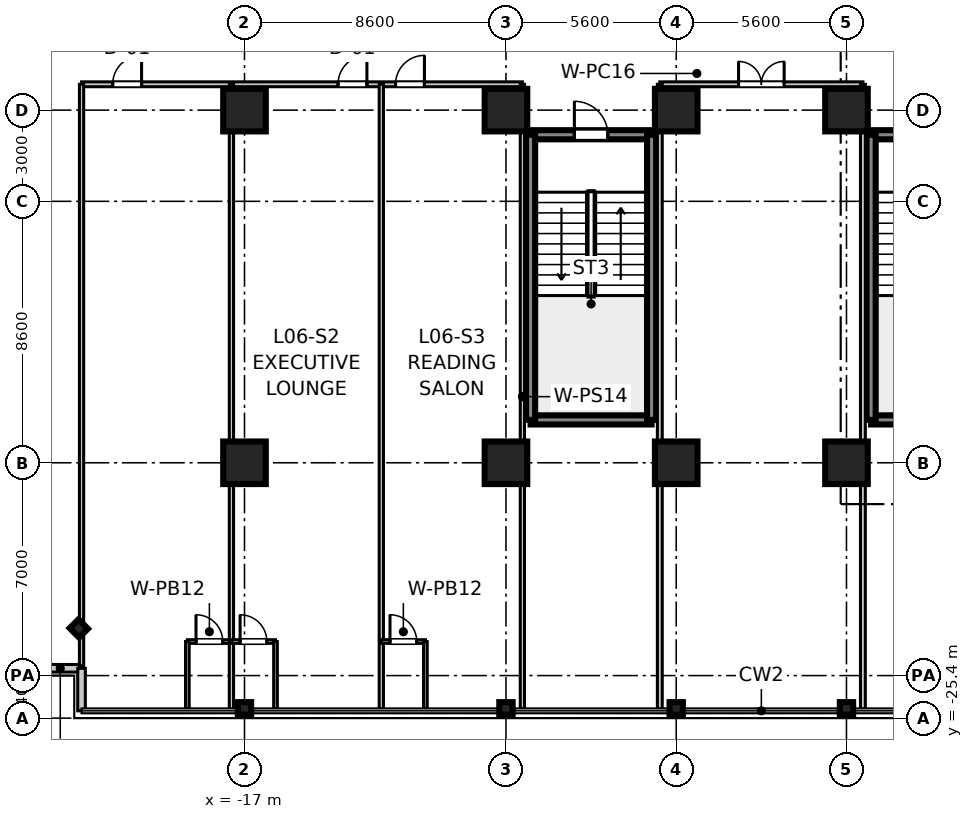
"""IFC4 building model, lengths in metres.
Left out: names, types, materials, properties, quantities, classifications, styles, units other than length and angle.
Written with IfcOpenShell. Run it as: python <this file> out.ifc"""

import sys

from ifc_helpers import new_model, si_unit, direction, frame, frame_2d, origin, origin_2d, place, context, subcontext, project, spatial, rectangle, i_section, extrude, source, transform, mapped, element, fill, save


model = new_model("IFC4")
c1 = context("Model", 3, precision=1e-05, world=origin(), true_north=direction((0.0, 1.0)))
c2 = subcontext(c1, "Body", "Model", "MODEL_VIEW")
j1 = project(units=[si_unit("LENGTHUNIT", "METRE"), si_unit("PLANEANGLEUNIT", "RADIAN")], contexts=[c1])
p1 = place(None, origin())
s1 = spatial("IfcSite", under=j1, at=p1, CompositionType="ELEMENT")
p2 = place(p1, origin())
s2 = spatial("IfcBuilding", under=s1, at=p2, CompositionType="ELEMENT")
p3 = place(p2, frame((0.0, 0.0, 32.4)))
s3 = spatial("IfcBuildingStorey", under=s2, at=p3, CompositionType="ELEMENT", Elevation=32.4)
m1 = source(origin(), c2, "Body", "SweptSolid", [
    extrude(rectangle(XDim=1.4, YDim=1.4, at=origin_2d()), origin(), (0.0, 0.0, 1.0), 3.605),
])
for number, where, z_axis, x_axis in (
    (1, (-17.0, -17.0, 0.0), (0.0, 0.0, 1.0), (1.0, 0.0, 0.0)),
    (2, (-17.0, -5.4, 0.0), (0.0, 0.0, 1.0), (1.0, 0.0, 0.0)),
    (3, (-8.4, -17.0, 0.0), (0.0, 0.0, 1.0), (1.0, 0.0, 0.0)),
    (4, (-8.4, -5.4, 0.0), (0.0, 0.0, 1.0), (1.0, 0.0, 0.0)),
    (5, (-2.8, -17.0, 0.0), (0.0, 0.0, 1.0), (1.0, 0.0, 0.0)),
    (6, (-2.8, -5.4, 0.0), (0.0, 0.0, 1.0), (1.0, 0.0, 0.0)),
    (7, (2.8, -17.0, 0.0), (0.0, 0.0, 1.0), (1.0, 0.0, 0.0)),
    (8, (2.8, -5.4, 0.0), (0.0, 0.0, 1.0), (1.0, 0.0, 0.0)),
):
    element("IfcColumn", number, at=place(p3, frame(where, z_axis=z_axis, x_axis=x_axis)), inside=s3, PredefinedType="COLUMN", context=c2, shape_type="MappedRepresentation", body=[
        mapped(m1, transform((0.0, 0.0, 0.0), scale=1.0)),
    ])
m2 = source(origin(), c2, "Body", "SweptSolid", [
    extrude(i_section(OverallWidth=0.412, OverallDepth=0.438, WebThickness=0.023, FlangeThickness=0.036, at=origin_2d()), origin(), (0.0, 0.0, 1.0), 3.605),
])
for number, where, z_axis, x_axis in (
    (9, (-17.0, -25.08, 0.0), (0.0, 0.0, 1.0), (0.0, 1.0, 0.0)),
    (10, (-8.4, -25.08, 0.0), (0.0, 0.0, 1.0), (0.0, 1.0, 0.0)),
    (11, (-2.8, -25.08, 0.0), (0.0, 0.0, 1.0), (0.0, 1.0, 0.0)),
    (12, (2.8, -25.08, 0.0), (0.0, 0.0, 1.0), (0.0, 1.0, 0.0)),
    (13, (-22.45, -22.45, 0.0), (0.0, 0.0, 1.0), (0.707, 0.707, 0.0)),
):
    element("IfcColumn", number, at=place(p3, frame(where, z_axis=z_axis, x_axis=x_axis)), inside=s3, PredefinedType="COLUMN", context=c2, shape_type="MappedRepresentation", body=[
        mapped(m2, transform((0.0, 0.0, 0.0), scale=1.0)),
    ])
m3 = source(origin(), c2, "Body", "SweptSolid", [
    extrude(rectangle(XDim=3.98, YDim=0.3, at=frame_2d((1.99, 0.0))), origin(), (0.0, 0.0, 1.0), 3.37),
])
for number, where, z_axis, x_axis in (
    (14, (3.61, -15.59, 0.0), (0.0, 0.0, 1.0), (1.0, 0.0, 0.0)),
    (15, (3.61, -6.21, 0.0), (0.0, 0.0, 1.0), (1.0, 0.0, 0.0)),
):
    element("IfcWall", number, at=place(p3, frame(where, z_axis=z_axis, x_axis=x_axis)), inside=s3, PredefinedType="SHEAR", context=c2, shape_type="MappedRepresentation", body=[
        mapped(m3, transform((0.0, 0.0, 0.0), scale=1.0)),
    ])
m4 = source(origin(), c2, "Body", "SweptSolid", [
    extrude(rectangle(XDim=9.38, YDim=0.3, at=frame_2d((4.69, 0.0))), origin(), (0.0, 0.0, 1.0), 3.37),
])
p4 = place(p3, frame((3.61, -15.59, 0.0), z_axis=(0.0, 0.0, 1.0), x_axis=(0.0, 1.0, 0.0)))
e16 = element("IfcWall", 16, at=p4, inside=s3, PredefinedType="SHEAR", context=c2, shape_type="MappedRepresentation", body=[
    mapped(m4, transform((0.0, 0.0, 0.0), scale=1.0)),
])
p5 = place(p3, frame((-7.59, -15.59, 0.0), z_axis=(0.0, 0.0, 1.0), x_axis=(1.0, 0.0, 0.0)))
e17 = element("IfcWall", 17, at=p5, inside=s3, PredefinedType="SHEAR", context=c2, shape_type="MappedRepresentation", body=[
    mapped(m3, transform((0.0, 0.0, 0.0), scale=1.0)),
])
p6 = place(p3, frame((-7.59, -6.21, 0.0), z_axis=(0.0, 0.0, 1.0), x_axis=(1.0, 0.0, 0.0)))
e18 = element("IfcWall", 18, at=p6, inside=s3, PredefinedType="SHEAR", context=c2, shape_type="MappedRepresentation", body=[
    mapped(m3, transform((0.0, 0.0, 0.0), scale=1.0)),
])
p7 = place(p6, frame((1.44, 0.0, 0.0)))
e19 = element("IfcOpeningElement", 19, at=p7, cuts=e18, PredefinedType="OPENING", context=c2, shape_type="SweptSolid", body=[
    extrude(rectangle(XDim=1.1, YDim=2.15, at=frame_2d((0.55, 1.075))), frame((0.0, 0.16, 0.0), z_axis=(0.0, -1.0, 0.0), x_axis=(1.0, 0.0, 0.0)), (0.0, 0.0, 1.0), 0.32),
])
for number, where, z_axis, x_axis in (
    (20, (-7.59, -15.59, 0.0), (0.0, 0.0, 1.0), (0.0, 1.0, 0.0)),
    (21, (-3.61, -15.59, 0.0), (0.0, 0.0, 1.0), (0.0, 1.0, 0.0)),
):
    element("IfcWall", number, at=place(p3, frame(where, z_axis=z_axis, x_axis=x_axis)), inside=s3, PredefinedType="SHEAR", context=c2, shape_type="MappedRepresentation", body=[
        mapped(m4, transform((0.0, 0.0, 0.0), scale=1.0)),
    ])
m5 = source(origin(), c2, "Body", "SweptSolid", [
    extrude(rectangle(XDim=1.4, YDim=0.25, at=frame_2d((0.7, 0.0))), origin(), (0.0, 0.0, 1.0), 3.37),
])
for number, where, z_axis, x_axis in (
    (22, (-23.76, -23.76, 0.0), (0.0, 0.0, 1.0), (1.0, 0.0, 0.0)),
    (23, (-22.36, -25.16, 0.0), (0.0, 0.0, 1.0), (0.0, 1.0, 0.0)),
):
    element("IfcWall", number, at=place(p3, frame(where, z_axis=z_axis, x_axis=x_axis)), inside=s3, PredefinedType="STANDARD", context=c2, shape_type="MappedRepresentation", body=[
        mapped(m5, transform((0.0, 0.0, 0.0), scale=1.0)),
    ])
m6 = source(origin(), c2, "Body", "SweptSolid", [
    extrude(rectangle(XDim=14.5, YDim=0.16, at=frame_2d((7.25, 0.0))), origin(), (0.0, 0.0, 1.0), 2.71),
])
p8 = place(p3, frame((-22.36, -4.55, 0.0), z_axis=(0.0, 0.0, 1.0), x_axis=(1.0, 0.0, 0.0)))
e24 = element("IfcWall", 24, at=p8, inside=s3, PredefinedType="PARTITIONING", context=c2, shape_type="MappedRepresentation", body=[
    mapped(m6, transform((0.0, 0.0, 0.0), scale=1.0)),
])
p9 = place(p8, frame((1.025, 0.0, 0.0)))
e25 = element("IfcOpeningElement", 25, at=p9, cuts=e24, PredefinedType="OPENING", context=c2, shape_type="SweptSolid", body=[
    extrude(rectangle(XDim=0.95, YDim=2.1, at=frame_2d((0.475, 1.05))), frame((0.0, 0.09, 0.0), z_axis=(0.0, -1.0, 0.0), x_axis=(1.0, 0.0, 0.0)), (0.0, 0.0, 1.0), 0.18),
])
p10 = place(p8, frame((8.436, 0.0, 0.0)))
e26 = element("IfcOpeningElement", 26, at=p10, cuts=e24, PredefinedType="OPENING", context=c2, shape_type="SweptSolid", body=[
    extrude(rectangle(XDim=0.95, YDim=2.1, at=frame_2d((0.475, 1.05))), frame((0.0, 0.09, 0.0), z_axis=(0.0, -1.0, 0.0), x_axis=(1.0, 0.0, 0.0)), (0.0, 0.0, 1.0), 0.18),
])
p11 = place(p8, frame((10.328, 0.0, 0.0)))
e27 = element("IfcOpeningElement", 27, at=p11, cuts=e24, PredefinedType="OPENING", context=c2, shape_type="SweptSolid", body=[
    extrude(rectangle(XDim=0.95, YDim=2.1, at=frame_2d((0.475, 1.05))), frame((0.0, 0.09, 0.0), z_axis=(0.0, -1.0, 0.0), x_axis=(1.0, 0.0, 0.0)), (0.0, 0.0, 1.0), 0.18),
])
m7 = source(origin(), c2, "Body", "SweptSolid", [
    extrude(rectangle(XDim=19.13, YDim=0.14, at=frame_2d((9.565, 0.0))), origin(), (0.0, 0.0, 1.0), 2.71),
])
p12 = place(p3, frame((-22.36, -23.68, 0.0), z_axis=(0.0, 0.0, 1.0), x_axis=(0.0, 1.0, 0.0)))
e28 = element("IfcWall", 28, at=p12, inside=s3, PredefinedType="PARTITIONING", context=c2, shape_type="MappedRepresentation", body=[
    mapped(m7, transform((0.0, 0.0, 0.0), scale=1.0)),
])
m8 = source(origin(), c2, "Body", "SweptSolid", [
    extrude(rectangle(XDim=20.55, YDim=0.14, at=frame_2d((10.275, 0.0))), origin(), (0.0, 0.0, 1.0), 2.71),
])
p13 = place(p3, frame((-7.86, -25.1, 0.0), z_axis=(0.0, 0.0, 1.0), x_axis=(0.0, 1.0, 0.0)))
e29 = element("IfcWall", 29, at=p13, inside=s3, PredefinedType="PARTITIONING", context=c2, shape_type="MappedRepresentation", body=[
    mapped(m8, transform((0.0, 0.0, 0.0), scale=1.0)),
])
m9 = source(origin(), c2, "Body", "SweptSolid", [
    extrude(rectangle(XDim=1.45, YDim=0.12, at=frame_2d((0.725, 0.0))), origin(), (0.0, 0.0, 1.0), 2.71),
])
p14 = place(p3, frame((-18.88, -22.88, 0.0), z_axis=(0.0, 0.0, 1.0), x_axis=(1.0, 0.0, 0.0)))
e30 = element("IfcWall", 30, at=p14, inside=s3, PredefinedType="PARTITIONING", context=c2, shape_type="MappedRepresentation", body=[
    mapped(m9, transform((0.0, 0.0, 0.0), scale=1.0)),
])
p15 = place(p14, frame((0.285, 0.0, 0.0)))
e31 = element("IfcOpeningElement", 31, at=p15, cuts=e30, PredefinedType="OPENING", context=c2, shape_type="SweptSolid", body=[
    extrude(rectangle(XDim=0.88, YDim=2.1, at=frame_2d((0.44, 1.05))), frame((0.0, 0.07, 0.0), z_axis=(0.0, -1.0, 0.0), x_axis=(1.0, 0.0, 0.0)), (0.0, 0.0, 1.0), 0.14),
])
m10 = source(origin(), c2, "Body", "SweptSolid", [
    extrude(rectangle(XDim=2.22, YDim=0.12, at=frame_2d((1.11, 0.0))), origin(), (0.0, 0.0, 1.0), 2.71),
])
p16 = place(p3, frame((-18.88, -25.1, 0.0), z_axis=(0.0, 0.0, 1.0), x_axis=(0.0, 1.0, 0.0)))
e32 = element("IfcWall", 32, at=p16, inside=s3, PredefinedType="PARTITIONING", context=c2, shape_type="MappedRepresentation", body=[
    mapped(m10, transform((0.0, 0.0, 0.0), scale=1.0)),
])
p17 = place(p3, frame((-17.43, -25.1, 0.0), z_axis=(0.0, 0.0, 1.0), x_axis=(0.0, 1.0, 0.0)))
e33 = element("IfcWall", 33, at=p17, inside=s3, PredefinedType="PARTITIONING", context=c2, shape_type="MappedRepresentation", body=[
    mapped(m8, transform((0.0, 0.0, 0.0), scale=1.0)),
])
p18 = place(p3, frame((-17.43, -22.88, 0.0), z_axis=(0.0, 0.0, 1.0), x_axis=(1.0, 0.0, 0.0)))
e34 = element("IfcWall", 34, at=p18, inside=s3, PredefinedType="PARTITIONING", context=c2, shape_type="MappedRepresentation", body=[
    mapped(m9, transform((0.0, 0.0, 0.0), scale=1.0)),
])
p19 = place(p18, frame((0.285, 0.0, 0.0)))
e35 = element("IfcOpeningElement", 35, at=p19, cuts=e34, PredefinedType="OPENING", context=c2, shape_type="SweptSolid", body=[
    extrude(rectangle(XDim=0.88, YDim=2.1, at=frame_2d((0.44, 1.05))), frame((0.0, 0.07, 0.0), z_axis=(0.0, -1.0, 0.0), x_axis=(1.0, 0.0, 0.0)), (0.0, 0.0, 1.0), 0.14),
])
p20 = place(p3, frame((-15.98, -25.1, 0.0), z_axis=(0.0, 0.0, 1.0), x_axis=(0.0, 1.0, 0.0)))
e36 = element("IfcWall", 36, at=p20, inside=s3, PredefinedType="PARTITIONING", context=c2, shape_type="MappedRepresentation", body=[
    mapped(m10, transform((0.0, 0.0, 0.0), scale=1.0)),
])
p21 = place(p3, frame((-12.5, -25.1, 0.0), z_axis=(0.0, 0.0, 1.0), x_axis=(0.0, 1.0, 0.0)))
e37 = element("IfcWall", 37, at=p21, inside=s3, PredefinedType="PARTITIONING", context=c2, shape_type="MappedRepresentation", body=[
    mapped(m8, transform((0.0, 0.0, 0.0), scale=1.0)),
])
p22 = place(p3, frame((-12.5, -22.88, 0.0), z_axis=(0.0, 0.0, 1.0), x_axis=(1.0, 0.0, 0.0)))
e38 = element("IfcWall", 38, at=p22, inside=s3, PredefinedType="PARTITIONING", context=c2, shape_type="MappedRepresentation", body=[
    mapped(m9, transform((0.0, 0.0, 0.0), scale=1.0)),
])
p23 = place(p22, frame((0.285, 0.0, 0.0)))
e39 = element("IfcOpeningElement", 39, at=p23, cuts=e38, PredefinedType="OPENING", context=c2, shape_type="SweptSolid", body=[
    extrude(rectangle(XDim=0.88, YDim=2.1, at=frame_2d((0.44, 1.05))), frame((0.0, 0.07, 0.0), z_axis=(0.0, -1.0, 0.0), x_axis=(1.0, 0.0, 0.0)), (0.0, 0.0, 1.0), 0.14),
])
p24 = place(p3, frame((-11.05, -25.1, 0.0), z_axis=(0.0, 0.0, 1.0), x_axis=(0.0, 1.0, 0.0)))
e40 = element("IfcWall", 40, at=p24, inside=s3, PredefinedType="PARTITIONING", context=c2, shape_type="MappedRepresentation", body=[
    mapped(m10, transform((0.0, 0.0, 0.0), scale=1.0)),
])
m11 = source(origin(), c2, "Body", "SweptSolid", [
    extrude(rectangle(XDim=6.68, YDim=0.16, at=frame_2d((3.34, 0.0))), origin(), (0.0, 0.0, 1.0), 2.71),
])
p25 = place(p3, frame((-3.34, -4.55, 0.0), z_axis=(0.0, 0.0, 1.0), x_axis=(1.0, 0.0, 0.0)))
e41 = element("IfcWall", 41, at=p25, inside=s3, PredefinedType="PARTITIONING", context=c2, shape_type="MappedRepresentation", body=[
    mapped(m11, transform((0.0, 0.0, 0.0), scale=1.0)),
])
p26 = place(p25, frame((2.59, 0.0, 0.0)))
e42 = element("IfcOpeningElement", 42, at=p26, cuts=e41, PredefinedType="OPENING", context=c2, shape_type="SweptSolid", body=[
    extrude(rectangle(XDim=1.5, YDim=2.15, at=frame_2d((0.75, 1.075))), frame((0.0, 0.09, 0.0), z_axis=(0.0, -1.0, 0.0), x_axis=(1.0, 0.0, 0.0)), (0.0, 0.0, 1.0), 0.18),
])
m12 = source(origin(), c2, "Body", "SweptSolid", [
    extrude(rectangle(XDim=20.55, YDim=0.16, at=frame_2d((10.275, 0.0))), origin(), (0.0, 0.0, 1.0), 2.71),
])
for number, where, z_axis, x_axis in (
    (43, (-3.34, -25.1, 0.0), (0.0, 0.0, 1.0), (0.0, 1.0, 0.0)),
    (44, (3.34, -25.1, 0.0), (0.0, 0.0, 1.0), (0.0, 1.0, 0.0)),
):
    element("IfcWall", number, at=place(p3, frame(where, z_axis=z_axis, x_axis=x_axis)), inside=s3, PredefinedType="PARTITIONING", context=c2, shape_type="MappedRepresentation", body=[
        mapped(m12, transform((0.0, 0.0, 0.0), scale=1.0)),
    ])
m13 = source(origin(), c2, "Body", "SweptSolid", [
    extrude(rectangle(XDim=1.1, YDim=2.15, at=frame_2d((0.55, 1.075))), frame((0.0, 0.025, 0.0), z_axis=(0.0, -1.0, 0.0), x_axis=(1.0, 0.0, 0.0)), (0.0, 0.0, 1.0), 0.05),
])
p27 = place(p7, frame((1.1, 0.0, 0.0), z_axis=(0.0, 0.0, 1.0), x_axis=(-1.0, 0.0, 0.0)))
e45 = element("IfcDoor", 45, at=p27, inside=s3, OperationType="SINGLE_SWING_LEFT", PredefinedType="DOOR", context=c2, shape_type="MappedRepresentation", body=[
    mapped(m13, transform((0.0, 0.0, 0.0), scale=1.0)),
])
fill(e19, e45)
m14 = source(origin(), c2, "Body", "SweptSolid", [
    extrude(rectangle(XDim=0.88, YDim=2.1, at=frame_2d((0.44, 1.05))), frame((0.0, 0.025, 0.0), z_axis=(0.0, -1.0, 0.0), x_axis=(1.0, 0.0, 0.0)), (0.0, 0.0, 1.0), 0.05),
])
p28 = place(p15, frame((0.88, 0.0, 0.0), z_axis=(0.0, 0.0, 1.0), x_axis=(-1.0, 0.0, 0.0)))
e46 = element("IfcDoor", 46, at=p28, inside=s3, OperationType="SINGLE_SWING_LEFT", PredefinedType="DOOR", context=c2, shape_type="MappedRepresentation", body=[
    mapped(m14, transform((0.0, 0.0, 0.0), scale=1.0)),
])
fill(e31, e46)
m15 = source(origin(), c2, "Body", "SweptSolid", [
    extrude(rectangle(XDim=0.95, YDim=2.1, at=frame_2d((0.475, 1.05))), frame((0.0, 0.025, 0.0), z_axis=(0.0, -1.0, 0.0), x_axis=(1.0, 0.0, 0.0)), (0.0, 0.0, 1.0), 0.05),
])
p29 = place(p9, frame((0.95, 0.0, 0.0), z_axis=(0.0, 0.0, 1.0), x_axis=(-1.0, 0.0, 0.0)))
e47 = element("IfcDoor", 47, at=p29, inside=s3, OperationType="SINGLE_SWING_RIGHT", PredefinedType="DOOR", context=c2, shape_type="MappedRepresentation", body=[
    mapped(m15, transform((0.0, 0.0, 0.0), scale=1.0)),
])
fill(e25, e47)
p30 = place(p19, frame((0.88, 0.0, 0.0), z_axis=(0.0, 0.0, 1.0), x_axis=(-1.0, 0.0, 0.0)))
e48 = element("IfcDoor", 48, at=p30, inside=s3, OperationType="SINGLE_SWING_LEFT", PredefinedType="DOOR", context=c2, shape_type="MappedRepresentation", body=[
    mapped(m14, transform((0.0, 0.0, 0.0), scale=1.0)),
])
fill(e35, e48)
p31 = place(p10, frame((0.95, 0.0, 0.0), z_axis=(0.0, 0.0, 1.0), x_axis=(-1.0, 0.0, 0.0)))
e49 = element("IfcDoor", 49, at=p31, inside=s3, OperationType="SINGLE_SWING_RIGHT", PredefinedType="DOOR", context=c2, shape_type="MappedRepresentation", body=[
    mapped(m15, transform((0.0, 0.0, 0.0), scale=1.0)),
])
fill(e26, e49)
p32 = place(p23, frame((0.88, 0.0, 0.0), z_axis=(0.0, 0.0, 1.0), x_axis=(-1.0, 0.0, 0.0)))
e50 = element("IfcDoor", 50, at=p32, inside=s3, OperationType="SINGLE_SWING_LEFT", PredefinedType="DOOR", context=c2, shape_type="MappedRepresentation", body=[
    mapped(m14, transform((0.0, 0.0, 0.0), scale=1.0)),
])
fill(e39, e50)
p33 = place(p11, frame((0.95, 0.0, 0.0), z_axis=(0.0, 0.0, 1.0), x_axis=(-1.0, 0.0, 0.0)))
e51 = element("IfcDoor", 51, at=p33, inside=s3, OperationType="SINGLE_SWING_RIGHT", PredefinedType="DOOR", context=c2, shape_type="MappedRepresentation", body=[
    mapped(m15, transform((0.0, 0.0, 0.0), scale=1.0)),
])
fill(e27, e51)
m16 = source(origin(), c2, "Body", "SweptSolid", [
    extrude(rectangle(XDim=1.5, YDim=2.15, at=frame_2d((0.75, 1.075))), frame((0.0, 0.025, 0.0), z_axis=(0.0, -1.0, 0.0), x_axis=(1.0, 0.0, 0.0)), (0.0, 0.0, 1.0), 0.05),
])
p34 = place(p26, frame((1.5, 0.0, 0.0), z_axis=(0.0, 0.0, 1.0), x_axis=(-1.0, 0.0, 0.0)))
e52 = element("IfcDoor", 52, at=p34, inside=s3, OperationType="DOUBLE_DOOR_SINGLE_SWING", PredefinedType="DOOR", context=c2, shape_type="MappedRepresentation", body=[
    mapped(m16, transform((0.0, 0.0, 0.0), scale=1.0)),
])
fill(e42, e52)
save(model, sys.argv[1])
